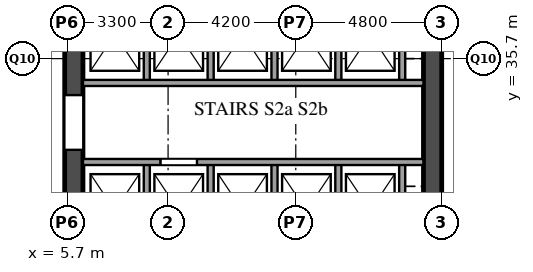
"""IFC4 building model, lengths in metres.
Left out: names, types, materials, properties, quantities, classifications, styles, units other than length and angle.
Written with IfcOpenShell. Run it as: python <this file> out.ifc"""

import sys

from ifc_helpers import new_model, si_unit, direction, frame, frame_2d, origin, place, context, subcontext, project, spatial, rectangle, extrude, element, fill, save


model = new_model("IFC4")
c1 = context("Model", 3, precision=1e-05, world=origin(), true_north=direction((0.0, 1.0)))
c2 = subcontext(c1, "Body", "Model", "MODEL_VIEW")
j1 = project(units=[si_unit("LENGTHUNIT", "METRE"), si_unit("PLANEANGLEUNIT", "RADIAN")], contexts=[c1])
p1 = place(None, origin())
s1 = spatial("IfcSite", under=j1, at=p1, CompositionType="ELEMENT")
p2 = place(p1, origin())
s2 = spatial("IfcBuilding", under=s1, at=p2, CompositionType="ELEMENT")
p3 = place(p2, origin())
s3 = spatial("IfcBuildingStorey", under=s2, at=p3, CompositionType="ELEMENT", Elevation=0.0)
p4 = place(p3, frame((5.9, 29.1, 0.0), z_axis=(0.0, 0.0, 1.0), x_axis=(0.0, 1.0, 0.0)))
e1 = element("IfcWall", 1, at=p4, inside=s3, PredefinedType="SHEAR", context=c2, shape_type="SweptSolid", body=[
    extrude(rectangle(XDim=20.3, YDim=0.6, at=frame_2d((10.15, 0.0))), origin(), (0.0, 0.0, 1.0), 7.59),
])
p5 = place(p4, frame((3.6, 0.0, 0.0)))
e2 = element("IfcOpeningElement", 2, at=p5, cuts=e1, PredefinedType="OPENING", context=c2, shape_type="SweptSolid", body=[
    extrude(rectangle(XDim=1.8, YDim=2.1, at=frame_2d((0.9, 1.05))), frame((0.0, 0.31, 0.0), z_axis=(0.0, -1.0, 0.0), x_axis=(1.0, 0.0, 0.0)), (0.0, 0.0, 1.0), 0.62),
])
p6 = place(p4, frame((17.1, 0.0, 0.0)))
e3 = element("IfcOpeningElement", 3, at=p6, cuts=e1, PredefinedType="OPENING", context=c2, shape_type="SweptSolid", body=[
    extrude(rectangle(XDim=1.8, YDim=2.1, at=frame_2d((0.9, 1.05))), frame((0.0, 0.31, 0.0), z_axis=(0.0, -1.0, 0.0), x_axis=(1.0, 0.0, 0.0)), (0.0, 0.0, 1.0), 0.62),
])
p7 = place(p3, frame((17.7, 29.1, 0.0), z_axis=(0.0, 0.0, 1.0), x_axis=(0.0, 1.0, 0.0)))
e4 = element("IfcWall", 4, at=p7, inside=s3, PredefinedType="SHEAR", context=c2, shape_type="SweptSolid", body=[
    extrude(rectangle(XDim=20.3, YDim=0.6, at=frame_2d((10.15, 0.0))), origin(), (0.0, 0.0, 1.0), 7.59),
])
p8 = place(p7, frame((1.25, 0.0, 0.0)))
e5 = element("IfcOpeningElement", 5, at=p8, cuts=e4, PredefinedType="OPENING", context=c2, shape_type="SweptSolid", body=[
    extrude(rectangle(XDim=0.7, YDim=2.1, at=frame_2d((0.35, 1.05))), frame((0.0, 0.31, 0.0), z_axis=(0.0, -1.0, 0.0), x_axis=(1.0, 0.0, 0.0)), (0.0, 0.0, 1.0), 0.62),
])
p9 = place(p7, frame((7.05, 0.0, 0.0)))
e6 = element("IfcOpeningElement", 6, at=p9, cuts=e4, PredefinedType="OPENING", context=c2, shape_type="SweptSolid", body=[
    extrude(rectangle(XDim=0.7, YDim=2.1, at=frame_2d((0.35, 1.05))), frame((0.0, 0.31, 0.0), z_axis=(0.0, -1.0, 0.0), x_axis=(1.0, 0.0, 0.0)), (0.0, 0.0, 1.0), 0.62),
])
p10 = place(p7, frame((17.95, 0.0, 0.0), z_axis=(0.0, 0.0, 1.0), x_axis=(-1.0, 0.0, 0.0)))
e7 = element("IfcOpeningElement", 7, at=p10, cuts=e4, PredefinedType="OPENING", context=c2, shape_type="SweptSolid", body=[
    extrude(rectangle(XDim=1.8, YDim=2.4, at=frame_2d((0.9, 1.2))), frame((0.0, 0.31, 0.0), z_axis=(0.0, -1.0, 0.0), x_axis=(1.0, 0.0, 0.0)), (0.0, 0.0, 1.0), 0.62),
])
p11 = place(p7, frame((19.85, 0.0, 0.0), z_axis=(0.0, 0.0, 1.0), x_axis=(-1.0, 0.0, 0.0)))
e8 = element("IfcOpeningElement", 8, at=p11, cuts=e4, PredefinedType="OPENING", context=c2, shape_type="SweptSolid", body=[
    extrude(rectangle(XDim=1.8, YDim=2.4, at=frame_2d((0.9, 1.2))), frame((0.0, 0.31, 0.0), z_axis=(0.0, -1.0, 0.0), x_axis=(1.0, 0.0, 0.0)), (0.0, 0.0, 1.0), 0.62),
])
p12 = place(p3, frame((8.3, 29.1, 0.0), z_axis=(0.0, 0.0, 1.0), x_axis=(0.0, 1.0, 0.0)))
e9 = element("IfcWall", 9, at=p12, inside=s3, PredefinedType="SOLIDWALL", context=c2, shape_type="SweptSolid", body=[
    extrude(rectangle(XDim=3.2, YDim=0.2, at=frame_2d((1.6, 0.0))), origin(), (0.0, 0.0, 1.0), 7.59),
])
p13 = place(p3, frame((8.3, 34.9, 0.0), z_axis=(0.0, 0.0, 1.0), x_axis=(0.0, 1.0, 0.0)))
e10 = element("IfcWall", 10, at=p13, inside=s3, PredefinedType="SOLIDWALL", context=c2, shape_type="SweptSolid", body=[
    extrude(rectangle(XDim=3.2, YDim=0.2, at=frame_2d((1.6, 0.0))), origin(), (0.0, 0.0, 1.0), 7.59),
])
p14 = place(p3, frame((10.4, 29.1, 0.0), z_axis=(0.0, 0.0, 1.0), x_axis=(0.0, 1.0, 0.0)))
e11 = element("IfcWall", 11, at=p14, inside=s3, PredefinedType="SOLIDWALL", context=c2, shape_type="SweptSolid", body=[
    extrude(rectangle(XDim=3.2, YDim=0.2, at=frame_2d((1.6, 0.0))), origin(), (0.0, 0.0, 1.0), 7.59),
])
p15 = place(p3, frame((10.4, 34.9, 0.0), z_axis=(0.0, 0.0, 1.0), x_axis=(0.0, 1.0, 0.0)))
e12 = element("IfcWall", 12, at=p15, inside=s3, PredefinedType="SOLIDWALL", context=c2, shape_type="SweptSolid", body=[
    extrude(rectangle(XDim=3.2, YDim=0.2, at=frame_2d((1.6, 0.0))), origin(), (0.0, 0.0, 1.0), 7.59),
])
p16 = place(p3, frame((12.5, 29.1, 0.0), z_axis=(0.0, 0.0, 1.0), x_axis=(0.0, 1.0, 0.0)))
e13 = element("IfcWall", 13, at=p16, inside=s3, PredefinedType="SOLIDWALL", context=c2, shape_type="SweptSolid", body=[
    extrude(rectangle(XDim=3.2, YDim=0.2, at=frame_2d((1.6, 0.0))), origin(), (0.0, 0.0, 1.0), 7.59),
])
p17 = place(p3, frame((12.5, 34.9, 0.0), z_axis=(0.0, 0.0, 1.0), x_axis=(0.0, 1.0, 0.0)))
e14 = element("IfcWall", 14, at=p17, inside=s3, PredefinedType="SOLIDWALL", context=c2, shape_type="SweptSolid", body=[
    extrude(rectangle(XDim=3.2, YDim=0.2, at=frame_2d((1.6, 0.0))), origin(), (0.0, 0.0, 1.0), 7.59),
])
p18 = place(p3, frame((14.6, 29.1, 0.0), z_axis=(0.0, 0.0, 1.0), x_axis=(0.0, 1.0, 0.0)))
e15 = element("IfcWall", 15, at=p18, inside=s3, PredefinedType="SOLIDWALL", context=c2, shape_type="SweptSolid", body=[
    extrude(rectangle(XDim=3.2, YDim=0.2, at=frame_2d((1.6, 0.0))), origin(), (0.0, 0.0, 1.0), 7.59),
])
p19 = place(p3, frame((14.6, 34.9, 0.0), z_axis=(0.0, 0.0, 1.0), x_axis=(0.0, 1.0, 0.0)))
e16 = element("IfcWall", 16, at=p19, inside=s3, PredefinedType="SOLIDWALL", context=c2, shape_type="SweptSolid", body=[
    extrude(rectangle(XDim=3.2, YDim=0.2, at=frame_2d((1.6, 0.0))), origin(), (0.0, 0.0, 1.0), 7.59),
])
p20 = place(p3, frame((16.7, 29.1, 0.0), z_axis=(0.0, 0.0, 1.0), x_axis=(0.0, 1.0, 0.0)))
e17 = element("IfcWall", 17, at=p20, inside=s3, PredefinedType="SOLIDWALL", context=c2, shape_type="SweptSolid", body=[
    extrude(rectangle(XDim=3.2, YDim=0.2, at=frame_2d((1.6, 0.0))), origin(), (0.0, 0.0, 1.0), 7.59),
])
p21 = place(p3, frame((16.7, 34.9, 0.0), z_axis=(0.0, 0.0, 1.0), x_axis=(0.0, 1.0, 0.0)))
e18 = element("IfcWall", 18, at=p21, inside=s3, PredefinedType="SOLIDWALL", context=c2, shape_type="SweptSolid", body=[
    extrude(rectangle(XDim=3.2, YDim=0.2, at=frame_2d((1.6, 0.0))), origin(), (0.0, 0.0, 1.0), 7.59),
])
p22 = place(p3, frame((6.2, 32.3, 0.0), z_axis=(0.0, 0.0, 1.0), x_axis=(1.0, 0.0, 0.0)))
e19 = element("IfcWall", 19, at=p22, inside=s3, PredefinedType="SOLIDWALL", context=c2, shape_type="SweptSolid", body=[
    extrude(rectangle(XDim=11.2, YDim=0.2, at=frame_2d((5.6, 0.0))), origin(), (0.0, 0.0, 1.0), 7.59),
])
p23 = place(p22, frame((2.55, 0.0, 0.0)))
e20 = element("IfcOpeningElement", 20, at=p23, cuts=e19, PredefinedType="OPENING", context=c2, shape_type="SweptSolid", body=[
    extrude(rectangle(XDim=1.2, YDim=2.1, at=frame_2d((0.6, 1.05))), frame((0.0, 0.11, 0.0), z_axis=(0.0, -1.0, 0.0), x_axis=(1.0, 0.0, 0.0)), (0.0, 0.0, 1.0), 0.22),
])
p24 = place(p3, frame((6.2, 34.9, 0.0), z_axis=(0.0, 0.0, 1.0), x_axis=(1.0, 0.0, 0.0)))
e21 = element("IfcWall", 21, at=p24, inside=s3, PredefinedType="SOLIDWALL", context=c2, shape_type="SweptSolid", body=[
    extrude(rectangle(XDim=11.2, YDim=0.2, at=frame_2d((5.6, 0.0))), origin(), (0.0, 0.0, 1.0), 7.59),
])
p25 = place(p23, origin())
e22 = element("IfcDoor", 22, at=p25, inside=s3, OperationType="SLIDING_TO_LEFT", PredefinedType="DOOR", context=c2, shape_type="SweptSolid", body=[
    extrude(rectangle(XDim=1.2, YDim=2.1, at=frame_2d((0.6, 1.05))), frame((0.0, 0.025, 0.0), z_axis=(0.0, -1.0, 0.0), x_axis=(1.0, 0.0, 0.0)), (0.0, 0.0, 1.0), 0.05),
])
fill(e20, e22)
p26 = place(p5, origin())
e23 = element("IfcDoor", 23, at=p26, inside=s3, OperationType="DOUBLE_DOOR_SINGLE_SWING", PredefinedType="DOOR", context=c2, shape_type="SweptSolid", body=[
    extrude(rectangle(XDim=1.8, YDim=2.1, at=frame_2d((0.9, 1.05))), frame((0.0, 0.025, 0.0), z_axis=(0.0, -1.0, 0.0), x_axis=(1.0, 0.0, 0.0)), (0.0, 0.0, 1.0), 0.05),
])
fill(e2, e23)
save(model, sys.argv[1])
